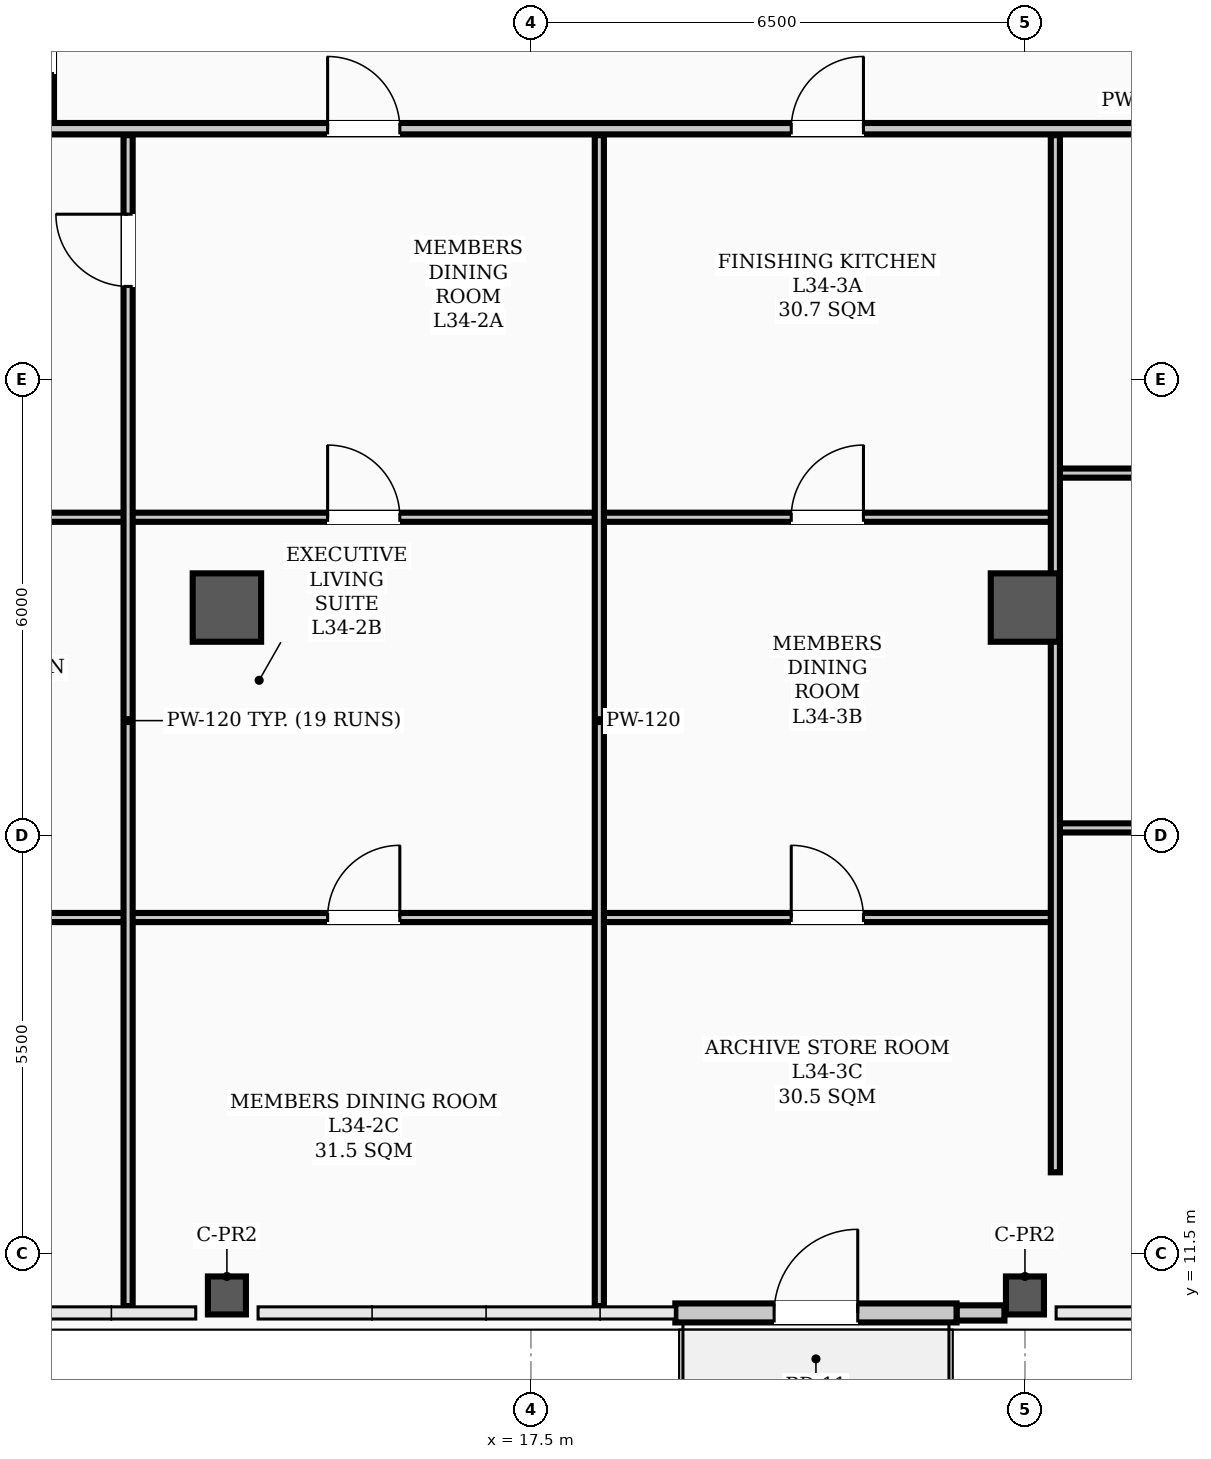
"""IFC4 building model, lengths in metres.
Left out: names, types, materials, properties, quantities, classifications, styles, units other than length and angle.
Written with IfcOpenShell. Run it as: python <this file> out.ifc"""

import sys

from ifc_helpers import new_model, si_unit, direction, frame, frame_2d, origin, origin_2d, place, context, subcontext, project, spatial, rectangle, hollow_rectangle, extrude, element, fill, save


model = new_model("IFC4")
c1 = context("Model", 3, precision=1e-05, world=origin(), true_north=direction((0.0, 1.0)))
c2 = subcontext(c1, "Body", "Model", "MODEL_VIEW")
j1 = project(units=[si_unit("LENGTHUNIT", "METRE"), si_unit("PLANEANGLEUNIT", "RADIAN")], contexts=[c1])
p1 = place(None, origin())
s1 = spatial("IfcSite", under=j1, at=p1, CompositionType="ELEMENT")
p2 = place(p1, origin())
s2 = spatial("IfcBuilding", under=s1, at=p2, CompositionType="ELEMENT")
p3 = place(p2, frame((0.0, 0.0, 138.3)))
s3 = spatial("IfcBuildingStorey", under=s2, at=p3, CompositionType="ELEMENT", Elevation=138.3)
for number, where, z_axis, x_axis in (
    (1, (13.5, 20.0, 0.0), (0.0, 0.0, 1.0), (1.0, 0.0, 0.0)),
    (2, (24.0, 20.0, 0.0), (0.0, 0.0, 1.0), (1.0, 0.0, 0.0)),
):
    element("IfcColumn", number, at=place(p3, frame(where, z_axis=z_axis, x_axis=x_axis)), inside=s3, PredefinedType="COLUMN", context=c2, shape_type="SweptSolid", body=[
        extrude(hollow_rectangle(XDim=0.9, YDim=0.9, WallThickness=0.035, InnerFilletRadius=0.017, OuterFilletRadius=0.052, at=origin_2d()), origin(), (0.0, 0.0, 1.0), 3.9),
    ])
for number, where, z_axis, x_axis in (
    (3, (13.5, 10.95, 0.0), (0.0, 0.0, 1.0), (1.0, 0.0, 0.0)),
    (4, (24.0, 10.95, 0.0), (0.0, 0.0, 1.0), (1.0, 0.0, 0.0)),
):
    element("IfcColumn", number, at=place(p3, frame(where, z_axis=z_axis, x_axis=x_axis)), inside=s3, PredefinedType="COLUMN", context=c2, shape_type="SweptSolid", body=[
        extrude(hollow_rectangle(XDim=0.5, YDim=0.5, WallThickness=0.024, InnerFilletRadius=0.012, OuterFilletRadius=0.036, at=origin_2d()), origin(), (0.0, 0.0, 1.0), 3.66),
    ])
p4 = place(p3, frame((23.1, 10.72, 0.0), z_axis=(0.0, 0.0, 1.0), x_axis=(1.0, 0.0, 0.0)))
e5 = element("IfcWall", 5, at=p4, inside=s3, PredefinedType="PARAPET", context=c2, shape_type="SweptSolid", body=[
    extrude(rectangle(XDim=0.63, YDim=0.2, at=frame_2d((0.315, 0.0))), origin(), (0.0, 0.0, 1.0), 1.2),
])
p5 = place(p3, frame((19.4, 10.72, 0.0), z_axis=(0.0, 0.0, 1.0), x_axis=(1.0, 0.0, 0.0)))
e6 = element("IfcWall", 6, at=p5, inside=s3, PredefinedType="STANDARD", context=c2, shape_type="SweptSolid", body=[
    extrude(rectangle(XDim=3.7, YDim=0.25, at=frame_2d((1.85, 0.0))), origin(), (0.0, 0.0, 1.0), 2.22),
])
p6 = place(p5, frame((1.3, 0.0, 0.0)))
e7 = element("IfcOpeningElement", 7, at=p6, cuts=e6, PredefinedType="OPENING", context=c2, shape_type="SweptSolid", body=[
    extrude(rectangle(XDim=1.1, YDim=2.2, at=frame_2d((0.55, 1.1))), frame((0.0, 0.135, 0.0), z_axis=(0.0, -1.0, 0.0), x_axis=(1.0, 0.0, 0.0)), (0.0, 0.0, 1.0), 0.27),
])
p7 = place(p3, frame((2.31, 26.3, 0.0), z_axis=(0.0, 0.0, 1.0), x_axis=(1.0, 0.0, 0.0)))
e8 = element("IfcWall", 8, at=p7, inside=s3, PredefinedType="PARTITIONING", context=c2, shape_type="SweptSolid", body=[
    extrude(rectangle(XDim=46.38, YDim=0.15, at=frame_2d((23.19, 0.0))), origin(), (0.0, 0.0, 1.0), 2.24),
])
p8 = place(p7, frame((12.515, 0.0, 0.0)))
e9 = element("IfcOpeningElement", 9, at=p8, cuts=e8, PredefinedType="OPENING", context=c2, shape_type="SweptSolid", body=[
    extrude(rectangle(XDim=0.95, YDim=2.08, at=frame_2d((0.475, 1.04))), frame((0.0, 0.085, 0.0), z_axis=(0.0, -1.0, 0.0), x_axis=(1.0, 0.0, 0.0)), (0.0, 0.0, 1.0), 0.17),
])
p9 = place(p7, frame((18.615, 0.0, 0.0)))
e10 = element("IfcOpeningElement", 10, at=p9, cuts=e8, PredefinedType="OPENING", context=c2, shape_type="SweptSolid", body=[
    extrude(rectangle(XDim=0.95, YDim=2.08, at=frame_2d((0.475, 1.04))), frame((0.0, 0.085, 0.0), z_axis=(0.0, -1.0, 0.0), x_axis=(1.0, 0.0, 0.0)), (0.0, 0.0, 1.0), 0.17),
])
p10 = place(p7, frame((26.115, 0.0, 0.0)))
e11 = element("IfcOpeningElement", 11, at=p10, cuts=e8, PredefinedType="OPENING", context=c2, shape_type="SweptSolid", body=[
    extrude(rectangle(XDim=0.95, YDim=2.08, at=frame_2d((0.475, 1.04))), frame((0.0, 0.085, 0.0), z_axis=(0.0, -1.0, 0.0), x_axis=(1.0, 0.0, 0.0)), (0.0, 0.0, 1.0), 0.17),
])
p11 = place(p7, frame((31.665, 0.0, 0.0)))
e12 = element("IfcOpeningElement", 12, at=p11, cuts=e8, PredefinedType="OPENING", context=c2, shape_type="SweptSolid", body=[
    extrude(rectangle(XDim=0.95, YDim=2.08, at=frame_2d((0.475, 1.04))), frame((0.0, 0.085, 0.0), z_axis=(0.0, -1.0, 0.0), x_axis=(1.0, 0.0, 0.0)), (0.0, 0.0, 1.0), 0.17),
])
p12 = place(p7, frame((43.06, 0.0, 0.0)))
e13 = element("IfcOpeningElement", 13, at=p12, cuts=e8, PredefinedType="OPENING", context=c2, shape_type="SweptSolid", body=[
    extrude(rectangle(XDim=0.95, YDim=2.08, at=frame_2d((0.475, 1.04))), frame((0.0, 0.085, 0.0), z_axis=(0.0, -1.0, 0.0), x_axis=(1.0, 0.0, 0.0)), (0.0, 0.0, 1.0), 0.17),
])
p13 = place(p3, frame((2.31, 21.188, 0.0), z_axis=(0.0, 0.0, 1.0), x_axis=(1.0, 0.0, 0.0)))
e14 = element("IfcWall", 14, at=p13, inside=s3, PredefinedType="PARTITIONING", context=c2, shape_type="SweptSolid", body=[
    extrude(rectangle(XDim=9.89, YDim=0.12, at=frame_2d((4.945, 0.0))), origin(), (0.0, 0.0, 1.0), 2.24),
])
p14 = place(p13, frame((4.47, 0.0, 0.0)))
e15 = element("IfcOpeningElement", 15, at=p14, cuts=e14, PredefinedType="OPENING", context=c2, shape_type="SweptSolid", body=[
    extrude(rectangle(XDim=0.95, YDim=2.08, at=frame_2d((0.475, 1.04))), frame((0.0, 0.07, 0.0), z_axis=(0.0, -1.0, 0.0), x_axis=(1.0, 0.0, 0.0)), (0.0, 0.0, 1.0), 0.14),
])
p15 = place(p3, frame((2.31, 15.922, 0.0), z_axis=(0.0, 0.0, 1.0), x_axis=(1.0, 0.0, 0.0)))
e16 = element("IfcWall", 16, at=p15, inside=s3, PredefinedType="PARTITIONING", context=c2, shape_type="SweptSolid", body=[
    extrude(rectangle(XDim=9.89, YDim=0.12, at=frame_2d((4.945, 0.0))), origin(), (0.0, 0.0, 1.0), 3.66),
])
p16 = place(p15, frame((4.47, 0.0, 0.0)))
e17 = element("IfcOpeningElement", 17, at=p16, cuts=e16, PredefinedType="OPENING", context=c2, shape_type="SweptSolid", body=[
    extrude(rectangle(XDim=0.95, YDim=2.08, at=frame_2d((0.475, 1.04))), frame((0.0, 0.07, 0.0), z_axis=(0.0, -1.0, 0.0), x_axis=(1.0, 0.0, 0.0)), (0.0, 0.0, 1.0), 0.14),
])
p17 = place(p3, frame((12.2, 21.188, 0.0), z_axis=(0.0, 0.0, 1.0), x_axis=(1.0, 0.0, 0.0)))
e18 = element("IfcWall", 18, at=p17, inside=s3, PredefinedType="PARTITIONING", context=c2, shape_type="SweptSolid", body=[
    extrude(rectangle(XDim=6.2, YDim=0.12, at=frame_2d((3.1, 0.0))), origin(), (0.0, 0.0, 1.0), 2.24),
])
p18 = place(p17, frame((2.625, 0.0, 0.0)))
e19 = element("IfcOpeningElement", 19, at=p18, cuts=e18, PredefinedType="OPENING", context=c2, shape_type="SweptSolid", body=[
    extrude(rectangle(XDim=0.95, YDim=2.08, at=frame_2d((0.475, 1.04))), frame((0.0, 0.07, 0.0), z_axis=(0.0, -1.0, 0.0), x_axis=(1.0, 0.0, 0.0)), (0.0, 0.0, 1.0), 0.14),
])
p19 = place(p3, frame((12.2, 15.922, 0.0), z_axis=(0.0, 0.0, 1.0), x_axis=(1.0, 0.0, 0.0)))
e20 = element("IfcWall", 20, at=p19, inside=s3, PredefinedType="PARTITIONING", context=c2, shape_type="SweptSolid", body=[
    extrude(rectangle(XDim=6.2, YDim=0.12, at=frame_2d((3.1, 0.0))), origin(), (0.0, 0.0, 1.0), 2.24),
])
p20 = place(p19, frame((2.625, 0.0, 0.0)))
e21 = element("IfcOpeningElement", 21, at=p20, cuts=e20, PredefinedType="OPENING", context=c2, shape_type="SweptSolid", body=[
    extrude(rectangle(XDim=0.95, YDim=2.08, at=frame_2d((0.475, 1.04))), frame((0.0, 0.07, 0.0), z_axis=(0.0, -1.0, 0.0), x_axis=(1.0, 0.0, 0.0)), (0.0, 0.0, 1.0), 0.14),
])
p21 = place(p3, frame((18.4, 21.188, 0.0), z_axis=(0.0, 0.0, 1.0), x_axis=(1.0, 0.0, 0.0)))
e22 = element("IfcWall", 22, at=p21, inside=s3, PredefinedType="PARTITIONING", context=c2, shape_type="SweptSolid", body=[
    extrude(rectangle(XDim=6.0, YDim=0.12, at=frame_2d((3.0, 0.0))), origin(), (0.0, 0.0, 1.0), 2.24),
])
p22 = place(p21, frame((2.525, 0.0, 0.0)))
e23 = element("IfcOpeningElement", 23, at=p22, cuts=e22, PredefinedType="OPENING", context=c2, shape_type="SweptSolid", body=[
    extrude(rectangle(XDim=0.95, YDim=2.08, at=frame_2d((0.475, 1.04))), frame((0.0, 0.07, 0.0), z_axis=(0.0, -1.0, 0.0), x_axis=(1.0, 0.0, 0.0)), (0.0, 0.0, 1.0), 0.14),
])
p23 = place(p3, frame((18.4, 15.922, 0.0), z_axis=(0.0, 0.0, 1.0), x_axis=(1.0, 0.0, 0.0)))
e24 = element("IfcWall", 24, at=p23, inside=s3, PredefinedType="PARTITIONING", context=c2, shape_type="SweptSolid", body=[
    extrude(rectangle(XDim=6.0, YDim=0.12, at=frame_2d((3.0, 0.0))), origin(), (0.0, 0.0, 1.0), 2.24),
])
p24 = place(p23, frame((2.525, 0.0, 0.0)))
e25 = element("IfcOpeningElement", 25, at=p24, cuts=e24, PredefinedType="OPENING", context=c2, shape_type="SweptSolid", body=[
    extrude(rectangle(XDim=0.95, YDim=2.08, at=frame_2d((0.475, 1.04))), frame((0.0, 0.07, 0.0), z_axis=(0.0, -1.0, 0.0), x_axis=(1.0, 0.0, 0.0)), (0.0, 0.0, 1.0), 0.14),
])
p25 = place(p3, frame((24.4, 21.769, 0.0), z_axis=(0.0, 0.0, 1.0), x_axis=(1.0, 0.0, 0.0)))
e26 = element("IfcWall", 26, at=p25, inside=s3, PredefinedType="PARTITIONING", context=c2, shape_type="SweptSolid", body=[
    extrude(rectangle(XDim=9.0, YDim=0.12, at=frame_2d((4.5, 0.0))), origin(), (0.0, 0.0, 1.0), 2.24),
])
p26 = place(p25, frame((4.025, 0.0, 0.0)))
e27 = element("IfcOpeningElement", 27, at=p26, cuts=e26, PredefinedType="OPENING", context=c2, shape_type="SweptSolid", body=[
    extrude(rectangle(XDim=0.95, YDim=2.08, at=frame_2d((0.475, 1.04))), frame((0.0, 0.07, 0.0), z_axis=(0.0, -1.0, 0.0), x_axis=(1.0, 0.0, 0.0)), (0.0, 0.0, 1.0), 0.14),
])
p27 = place(p3, frame((24.4, 17.101, 0.0), z_axis=(0.0, 0.0, 1.0), x_axis=(1.0, 0.0, 0.0)))
e28 = element("IfcWall", 28, at=p27, inside=s3, PredefinedType="PARTITIONING", context=c2, shape_type="SweptSolid", body=[
    extrude(rectangle(XDim=9.0, YDim=0.12, at=frame_2d((4.5, 0.0))), origin(), (0.0, 0.0, 1.0), 2.24),
])
p28 = place(p27, frame((4.025, 0.0, 0.0)))
e29 = element("IfcOpeningElement", 29, at=p28, cuts=e28, PredefinedType="OPENING", context=c2, shape_type="SweptSolid", body=[
    extrude(rectangle(XDim=0.95, YDim=2.08, at=frame_2d((0.475, 1.04))), frame((0.0, 0.07, 0.0), z_axis=(0.0, -1.0, 0.0), x_axis=(1.0, 0.0, 0.0)), (0.0, 0.0, 1.0), 0.14),
])
p29 = place(p3, frame((11.15, 26.385, 0.0), z_axis=(0.0, 0.0, 1.0), x_axis=(0.0, 1.0, 0.0)))
e30 = element("IfcWall", 30, at=p29, inside=s3, PredefinedType="PARTITIONING", context=c2, shape_type="SweptSolid", body=[
    extrude(rectangle(XDim=11.28, YDim=0.15, at=frame_2d((5.64, 0.0))), origin(), (0.0, 0.0, 1.0), 2.24),
])
p30 = place(p29, frame((0.64, 0.0, 0.0)))
e31 = element("IfcOpeningElement", 31, at=p30, cuts=e30, PredefinedType="OPENING", context=c2, shape_type="SweptSolid", body=[
    extrude(rectangle(XDim=0.95, YDim=2.08, at=frame_2d((0.475, 1.04))), frame((0.0, 0.085, 0.0), z_axis=(0.0, -1.0, 0.0), x_axis=(1.0, 0.0, 0.0)), (0.0, 0.0, 1.0), 0.17),
])
p31 = place(p29, frame((8.765, 0.0, 0.0)))
e32 = element("IfcOpeningElement", 32, at=p31, cuts=e30, PredefinedType="OPENING", context=c2, shape_type="SweptSolid", body=[
    extrude(rectangle(XDim=0.95, YDim=2.08, at=frame_2d((0.475, 1.04))), frame((0.0, 0.085, 0.0), z_axis=(0.0, -1.0, 0.0), x_axis=(1.0, 0.0, 0.0)), (0.0, 0.0, 1.0), 0.17),
])
p32 = place(p3, frame((12.2, 10.81, 0.0), z_axis=(0.0, 0.0, 1.0), x_axis=(0.0, 1.0, 0.0)))
e33 = element("IfcWall", 33, at=p32, inside=s3, PredefinedType="PARTITIONING", context=c2, shape_type="SweptSolid", body=[
    extrude(rectangle(XDim=15.405, YDim=0.12, at=frame_2d((7.703, 0.0))), origin(), (0.0, 0.0, 1.0), 2.24),
])
p33 = place(p32, frame((13.415, 0.0, 0.0)))
e34 = element("IfcOpeningElement", 34, at=p33, cuts=e33, PredefinedType="OPENING", context=c2, shape_type="SweptSolid", body=[
    extrude(rectangle(XDim=0.95, YDim=2.08, at=frame_2d((0.475, 1.04))), frame((0.0, 0.07, 0.0), z_axis=(0.0, -1.0, 0.0), x_axis=(1.0, 0.0, 0.0)), (0.0, 0.0, 1.0), 0.14),
])
p34 = place(p3, frame((18.4, 10.81, 0.0), z_axis=(0.0, 0.0, 1.0), x_axis=(0.0, 1.0, 0.0)))
e35 = element("IfcWall", 35, at=p34, inside=s3, PredefinedType="PARTITIONING", context=c2, shape_type="SweptSolid", body=[
    extrude(rectangle(XDim=15.405, YDim=0.12, at=frame_2d((7.703, 0.0))), origin(), (0.0, 0.0, 1.0), 2.24),
])
p35 = place(p3, frame((24.4, 12.57, 0.0), z_axis=(0.0, 0.0, 1.0), x_axis=(0.0, 1.0, 0.0)))
e36 = element("IfcWall", 36, at=p35, inside=s3, PredefinedType="PARTITIONING", context=c2, shape_type="SweptSolid", body=[
    extrude(rectangle(XDim=13.645, YDim=0.12, at=frame_2d((6.823, 0.0))), origin(), (0.0, 0.0, 1.0), 2.24),
])
p36 = place(p6, origin())
e37 = element("IfcDoor", 37, at=p36, inside=s3, OperationType="SINGLE_SWING_RIGHT", PredefinedType="DOOR", context=c2, shape_type="SweptSolid", body=[
    extrude(rectangle(XDim=1.1, YDim=2.2, at=frame_2d((0.55, 1.1))), frame((0.0, 0.025, 0.0), z_axis=(0.0, -1.0, 0.0), x_axis=(1.0, 0.0, 0.0)), (0.0, 0.0, 1.0), 0.05),
])
fill(e7, e37)
p37 = place(p33, origin())
e38 = element("IfcDoor", 38, at=p37, inside=s3, OperationType="SINGLE_SWING_RIGHT", PredefinedType="DOOR", context=c2, shape_type="SweptSolid", body=[
    extrude(rectangle(XDim=0.95, YDim=2.08, at=frame_2d((0.475, 1.04))), frame((0.0, 0.025, 0.0), z_axis=(0.0, -1.0, 0.0), x_axis=(1.0, 0.0, 0.0)), (0.0, 0.0, 1.0), 0.05),
])
fill(e34, e38)
p38 = place(p18, origin())
e39 = element("IfcDoor", 39, at=p38, inside=s3, OperationType="SINGLE_SWING_LEFT", PredefinedType="DOOR", context=c2, shape_type="SweptSolid", body=[
    extrude(rectangle(XDim=0.95, YDim=2.08, at=frame_2d((0.475, 1.04))), frame((0.0, 0.025, 0.0), z_axis=(0.0, -1.0, 0.0), x_axis=(1.0, 0.0, 0.0)), (0.0, 0.0, 1.0), 0.05),
])
fill(e19, e39)
p39 = place(p20, origin())
e40 = element("IfcDoor", 40, at=p39, inside=s3, OperationType="SINGLE_SWING_RIGHT", PredefinedType="DOOR", context=c2, shape_type="SweptSolid", body=[
    extrude(rectangle(XDim=0.95, YDim=2.08, at=frame_2d((0.475, 1.04))), frame((0.0, 0.025, 0.0), z_axis=(0.0, -1.0, 0.0), x_axis=(1.0, 0.0, 0.0)), (0.0, 0.0, 1.0), 0.05),
])
fill(e21, e40)
p40 = place(p8, origin())
e41 = element("IfcDoor", 41, at=p40, inside=s3, OperationType="SINGLE_SWING_LEFT", PredefinedType="DOOR", context=c2, shape_type="SweptSolid", body=[
    extrude(rectangle(XDim=0.95, YDim=2.08, at=frame_2d((0.475, 1.04))), frame((0.0, 0.025, 0.0), z_axis=(0.0, -1.0, 0.0), x_axis=(1.0, 0.0, 0.0)), (0.0, 0.0, 1.0), 0.05),
])
fill(e9, e41)
p41 = place(p22, origin())
e42 = element("IfcDoor", 42, at=p41, inside=s3, OperationType="SINGLE_SWING_RIGHT", PredefinedType="DOOR", context=c2, shape_type="SweptSolid", body=[
    extrude(rectangle(XDim=0.95, YDim=2.08, at=frame_2d((0.475, 1.04))), frame((0.0, 0.025, 0.0), z_axis=(0.0, -1.0, 0.0), x_axis=(1.0, 0.0, 0.0)), (0.0, 0.0, 1.0), 0.05),
])
fill(e23, e42)
p42 = place(p24, origin())
e43 = element("IfcDoor", 43, at=p42, inside=s3, OperationType="SINGLE_SWING_LEFT", PredefinedType="DOOR", context=c2, shape_type="SweptSolid", body=[
    extrude(rectangle(XDim=0.95, YDim=2.08, at=frame_2d((0.475, 1.04))), frame((0.0, 0.025, 0.0), z_axis=(0.0, -1.0, 0.0), x_axis=(1.0, 0.0, 0.0)), (0.0, 0.0, 1.0), 0.05),
])
fill(e25, e43)
p43 = place(p9, origin())
e44 = element("IfcDoor", 44, at=p43, inside=s3, OperationType="SINGLE_SWING_RIGHT", PredefinedType="DOOR", context=c2, shape_type="SweptSolid", body=[
    extrude(rectangle(XDim=0.95, YDim=2.08, at=frame_2d((0.475, 1.04))), frame((0.0, 0.025, 0.0), z_axis=(0.0, -1.0, 0.0), x_axis=(1.0, 0.0, 0.0)), (0.0, 0.0, 1.0), 0.05),
])
fill(e10, e44)
save(model, sys.argv[1])
